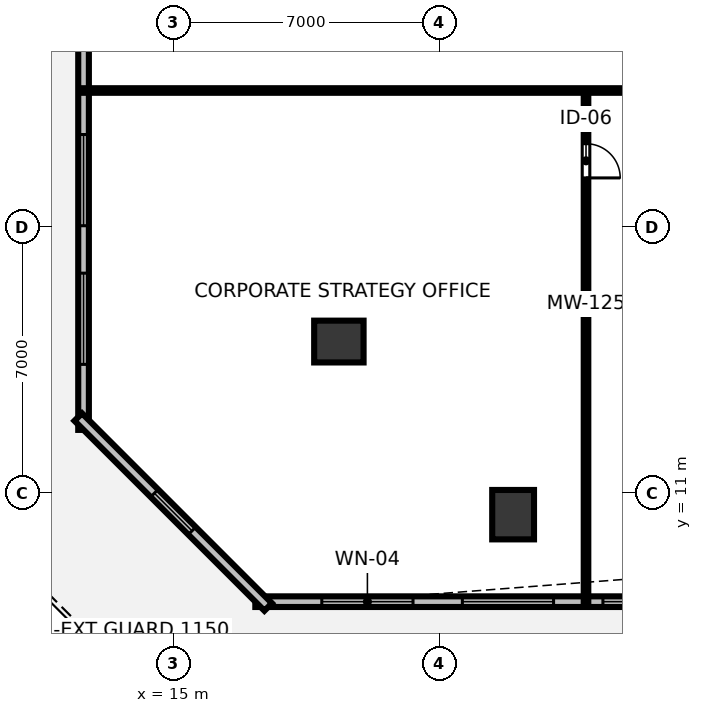
"""IFC4 building model, lengths in metres.
Left out: names, types, materials, properties, quantities, classifications, styles, units other than length and angle.
Written with IfcOpenShell. Run it as: python <this file> out.ifc"""

import sys

from ifc_helpers import new_model, si_unit, direction, frame, frame_2d, origin, origin_2d, place, context, subcontext, project, spatial, rectangle, hollow_rectangle, extrude, element, fill, save


model = new_model("IFC4")
c1 = context("Model", 3, precision=1e-05, world=origin(), true_north=direction((0.0, 1.0)))
c2 = subcontext(c1, "Body", "Model", "MODEL_VIEW")
j1 = project(units=[si_unit("LENGTHUNIT", "METRE"), si_unit("PLANEANGLEUNIT", "RADIAN")], contexts=[c1])
p1 = place(None, origin())
s1 = spatial("IfcSite", under=j1, at=p1, CompositionType="ELEMENT")
p2 = place(p1, origin())
s2 = spatial("IfcBuilding", under=s1, at=p2, CompositionType="ELEMENT")
p3 = place(p2, frame((0.0, 0.0, 14.0)))
s3 = spatial("IfcBuildingStorey", under=s2, at=p3, CompositionType="ELEMENT", Elevation=14.0)
for number, where, z_axis, x_axis in (
    (1, (23.943, 10.429, 0.0), (0.0, 0.0, 1.0), (1.0, 0.0, 0.0)),
    (2, (19.358, 14.984, 0.0), (0.0, 0.0, 1.0), (0.0, 1.0, 0.0)),
):
    element("IfcColumn", number, at=place(p3, frame(where, z_axis=z_axis, x_axis=x_axis)), inside=s3, PredefinedType="COLUMN", context=c2, shape_type="SweptSolid", body=[
        extrude(hollow_rectangle(XDim=1.1, YDim=1.3, WallThickness=0.07, at=origin_2d()), origin(), (0.0, 0.0, 1.0), 4.208),
    ])
p4 = place(p3, frame((17.16, 8.14, 0.0), z_axis=(0.0, 0.0, 1.0), x_axis=(1.0, 0.0, 0.0)))
e3 = element("IfcWall", 3, at=p4, inside=s3, PredefinedType="STANDARD", context=c2, shape_type="SweptSolid", body=[
    extrude(rectangle(XDim=57.68, YDim=0.28, at=frame_2d((28.84, 0.0))), origin(), (0.0, 0.0, 1.0), 4.21),
])
p5 = place(p4, frame((1.749, 0.0, 0.85)))
e4 = element("IfcOpeningElement", 4, at=p5, cuts=e3, PredefinedType="OPENING", context=c2, shape_type="SweptSolid", body=[
    extrude(rectangle(XDim=2.4, YDim=2.4, at=frame_2d((1.2, 1.2))), frame((0.0, 0.15, 0.0), z_axis=(0.0, -1.0, 0.0), x_axis=(1.0, 0.0, 0.0)), (0.0, 0.0, 1.0), 0.3),
])
p6 = place(p4, frame((5.448, 0.0, 0.85)))
e5 = element("IfcOpeningElement", 5, at=p6, cuts=e3, PredefinedType="OPENING", context=c2, shape_type="SweptSolid", body=[
    extrude(rectangle(XDim=2.4, YDim=2.4, at=frame_2d((1.2, 1.2))), frame((0.0, 0.15, 0.0), z_axis=(0.0, -1.0, 0.0), x_axis=(1.0, 0.0, 0.0)), (0.0, 0.0, 1.0), 0.3),
])
p7 = place(p4, frame((9.147, 0.0, 0.85)))
e6 = element("IfcOpeningElement", 6, at=p7, cuts=e3, PredefinedType="OPENING", context=c2, shape_type="SweptSolid", body=[
    extrude(rectangle(XDim=2.4, YDim=2.4, at=frame_2d((1.2, 1.2))), frame((0.0, 0.15, 0.0), z_axis=(0.0, -1.0, 0.0), x_axis=(1.0, 0.0, 0.0)), (0.0, 0.0, 1.0), 0.3),
])
p8 = place(p4, frame((12.845, 0.0, 0.85)))
e7 = element("IfcOpeningElement", 7, at=p8, cuts=e3, PredefinedType="OPENING", context=c2, shape_type="SweptSolid", body=[
    extrude(rectangle(XDim=2.4, YDim=2.4, at=frame_2d((1.2, 1.2))), frame((0.0, 0.15, 0.0), z_axis=(0.0, -1.0, 0.0), x_axis=(1.0, 0.0, 0.0)), (0.0, 0.0, 1.0), 0.3),
])
p9 = place(p4, frame((16.544, 0.0, 0.85)))
e8 = element("IfcOpeningElement", 8, at=p9, cuts=e3, PredefinedType="OPENING", context=c2, shape_type="SweptSolid", body=[
    extrude(rectangle(XDim=2.4, YDim=2.4, at=frame_2d((1.2, 1.2))), frame((0.0, 0.15, 0.0), z_axis=(0.0, -1.0, 0.0), x_axis=(1.0, 0.0, 0.0)), (0.0, 0.0, 1.0), 0.3),
])
p10 = place(p4, frame((23.941, 0.0, 0.85)))
e9 = element("IfcOpeningElement", 9, at=p10, cuts=e3, PredefinedType="OPENING", context=c2, shape_type="SweptSolid", body=[
    extrude(rectangle(XDim=2.4, YDim=2.4, at=frame_2d((1.2, 1.2))), frame((0.0, 0.15, 0.0), z_axis=(0.0, -1.0, 0.0), x_axis=(1.0, 0.0, 0.0)), (0.0, 0.0, 1.0), 0.3),
])
p11 = place(p4, frame((27.64, 0.0, 0.85)))
e10 = element("IfcOpeningElement", 10, at=p11, cuts=e3, PredefinedType="OPENING", context=c2, shape_type="SweptSolid", body=[
    extrude(rectangle(XDim=2.4, YDim=2.4, at=frame_2d((1.2, 1.2))), frame((0.0, 0.15, 0.0), z_axis=(0.0, -1.0, 0.0), x_axis=(1.0, 0.0, 0.0)), (0.0, 0.0, 1.0), 0.3),
])
p12 = place(p4, frame((31.339, 0.0, 0.85)))
e11 = element("IfcOpeningElement", 11, at=p12, cuts=e3, PredefinedType="OPENING", context=c2, shape_type="SweptSolid", body=[
    extrude(rectangle(XDim=2.4, YDim=2.4, at=frame_2d((1.2, 1.2))), frame((0.0, 0.15, 0.0), z_axis=(0.0, -1.0, 0.0), x_axis=(1.0, 0.0, 0.0)), (0.0, 0.0, 1.0), 0.3),
])
p13 = place(p4, frame((35.037, 0.0, 0.85)))
e12 = element("IfcOpeningElement", 12, at=p13, cuts=e3, PredefinedType="OPENING", context=c2, shape_type="SweptSolid", body=[
    extrude(rectangle(XDim=2.4, YDim=2.4, at=frame_2d((1.2, 1.2))), frame((0.0, 0.15, 0.0), z_axis=(0.0, -1.0, 0.0), x_axis=(1.0, 0.0, 0.0)), (0.0, 0.0, 1.0), 0.3),
])
p14 = place(p4, frame((38.736, 0.0, 0.85)))
e13 = element("IfcOpeningElement", 13, at=p14, cuts=e3, PredefinedType="OPENING", context=c2, shape_type="SweptSolid", body=[
    extrude(rectangle(XDim=2.4, YDim=2.4, at=frame_2d((1.2, 1.2))), frame((0.0, 0.15, 0.0), z_axis=(0.0, -1.0, 0.0), x_axis=(1.0, 0.0, 0.0)), (0.0, 0.0, 1.0), 0.3),
])
p15 = place(p4, frame((46.133, 0.0, 0.85)))
e14 = element("IfcOpeningElement", 14, at=p15, cuts=e3, PredefinedType="OPENING", context=c2, shape_type="SweptSolid", body=[
    extrude(rectangle(XDim=2.4, YDim=2.4, at=frame_2d((1.2, 1.2))), frame((0.0, 0.15, 0.0), z_axis=(0.0, -1.0, 0.0), x_axis=(1.0, 0.0, 0.0)), (0.0, 0.0, 1.0), 0.3),
])
p16 = place(p4, frame((49.832, 0.0, 0.85)))
e15 = element("IfcOpeningElement", 15, at=p16, cuts=e3, PredefinedType="OPENING", context=c2, shape_type="SweptSolid", body=[
    extrude(rectangle(XDim=2.4, YDim=2.4, at=frame_2d((1.2, 1.2))), frame((0.0, 0.15, 0.0), z_axis=(0.0, -1.0, 0.0), x_axis=(1.0, 0.0, 0.0)), (0.0, 0.0, 1.0), 0.3),
])
p17 = place(p4, frame((53.531, 0.0, 0.85)))
e16 = element("IfcOpeningElement", 16, at=p17, cuts=e3, PredefinedType="OPENING", context=c2, shape_type="SweptSolid", body=[
    extrude(rectangle(XDim=2.4, YDim=2.4, at=frame_2d((1.2, 1.2))), frame((0.0, 0.15, 0.0), z_axis=(0.0, -1.0, 0.0), x_axis=(1.0, 0.0, 0.0)), (0.0, 0.0, 1.0), 0.3),
])
p18 = place(p3, frame((12.64, 51.34, 0.0), z_axis=(0.0, 0.0, 1.0), x_axis=(0.0, -1.0, 0.0)))
e17 = element("IfcWall", 17, at=p18, inside=s3, PredefinedType="STANDARD", context=c2, shape_type="SweptSolid", body=[
    extrude(rectangle(XDim=38.68, YDim=0.28, at=frame_2d((19.34, 0.0))), origin(), (0.0, 0.0, 1.0), 4.21),
])
p19 = place(p18, frame((23.74, 0.0, 0.0)))
e18 = element("IfcOpeningElement", 18, at=p19, cuts=e17, PredefinedType="OPENING", context=c2, shape_type="SweptSolid", body=[
    extrude(rectangle(XDim=1.6, YDim=2.15, at=frame_2d((0.8, 1.075))), frame((0.0, 0.15, 0.0), z_axis=(0.0, -1.0, 0.0), x_axis=(1.0, 0.0, 0.0)), (0.0, 0.0, 1.0), 0.3),
])
p20 = place(p18, frame((1.724, 0.0, 0.85)))
e19 = element("IfcOpeningElement", 19, at=p20, cuts=e17, PredefinedType="OPENING", context=c2, shape_type="SweptSolid", body=[
    extrude(rectangle(XDim=2.4, YDim=2.4, at=frame_2d((1.2, 1.2))), frame((0.0, 0.15, 0.0), z_axis=(0.0, -1.0, 0.0), x_axis=(1.0, 0.0, 0.0)), (0.0, 0.0, 1.0), 0.3),
])
p21 = place(p18, frame((5.372, 0.0, 0.85)))
e20 = element("IfcOpeningElement", 20, at=p21, cuts=e17, PredefinedType="OPENING", context=c2, shape_type="SweptSolid", body=[
    extrude(rectangle(XDim=2.4, YDim=2.4, at=frame_2d((1.2, 1.2))), frame((0.0, 0.15, 0.0), z_axis=(0.0, -1.0, 0.0), x_axis=(1.0, 0.0, 0.0)), (0.0, 0.0, 1.0), 0.3),
])
p22 = place(p18, frame((12.668, 0.0, 0.85)))
e21 = element("IfcOpeningElement", 21, at=p22, cuts=e17, PredefinedType="OPENING", context=c2, shape_type="SweptSolid", body=[
    extrude(rectangle(XDim=2.4, YDim=2.4, at=frame_2d((1.2, 1.2))), frame((0.0, 0.15, 0.0), z_axis=(0.0, -1.0, 0.0), x_axis=(1.0, 0.0, 0.0)), (0.0, 0.0, 1.0), 0.3),
])
p23 = place(p18, frame((16.316, 0.0, 0.85)))
e22 = element("IfcOpeningElement", 22, at=p23, cuts=e17, PredefinedType="OPENING", context=c2, shape_type="SweptSolid", body=[
    extrude(rectangle(XDim=2.4, YDim=2.4, at=frame_2d((1.2, 1.2))), frame((0.0, 0.15, 0.0), z_axis=(0.0, -1.0, 0.0), x_axis=(1.0, 0.0, 0.0)), (0.0, 0.0, 1.0), 0.3),
])
p24 = place(p18, frame((19.964, 0.0, 0.85)))
e23 = element("IfcOpeningElement", 23, at=p24, cuts=e17, PredefinedType="OPENING", context=c2, shape_type="SweptSolid", body=[
    extrude(rectangle(XDim=2.4, YDim=2.4, at=frame_2d((1.2, 1.2))), frame((0.0, 0.15, 0.0), z_axis=(0.0, -1.0, 0.0), x_axis=(1.0, 0.0, 0.0)), (0.0, 0.0, 1.0), 0.3),
])
p25 = place(p18, frame((30.908, 0.0, 0.85)))
e24 = element("IfcOpeningElement", 24, at=p25, cuts=e17, PredefinedType="OPENING", context=c2, shape_type="SweptSolid", body=[
    extrude(rectangle(XDim=2.4, YDim=2.4, at=frame_2d((1.2, 1.2))), frame((0.0, 0.15, 0.0), z_axis=(0.0, -1.0, 0.0), x_axis=(1.0, 0.0, 0.0)), (0.0, 0.0, 1.0), 0.3),
])
p26 = place(p18, frame((34.556, 0.0, 0.85)))
e25 = element("IfcOpeningElement", 25, at=p26, cuts=e17, PredefinedType="OPENING", context=c2, shape_type="SweptSolid", body=[
    extrude(rectangle(XDim=2.4, YDim=2.4, at=frame_2d((1.2, 1.2))), frame((0.0, 0.15, 0.0), z_axis=(0.0, -1.0, 0.0), x_axis=(1.0, 0.0, 0.0)), (0.0, 0.0, 1.0), 0.3),
])
p27 = place(p3, frame((12.5, 12.998, 0.0), z_axis=(0.0, 0.0, 1.0), x_axis=(0.707106781187, -0.707106781187, 0.0)))
e26 = element("IfcWall", 26, at=p27, inside=s3, PredefinedType="STANDARD", context=c2, shape_type="SweptSolid", body=[
    extrude(rectangle(XDim=7.068, YDim=0.28, at=frame_2d((3.534, 0.0))), origin(), (0.0, 0.0, 1.0), 4.21),
])
p28 = place(p27, frame((2.834, 0.0, 1.5)))
e27 = element("IfcOpeningElement", 27, at=p28, cuts=e26, PredefinedType="OPENING", context=c2, shape_type="SweptSolid", body=[
    extrude(rectangle(XDim=1.4, YDim=1.2, at=frame_2d((0.7, 0.6))), frame((0.0, 0.15, 0.0), z_axis=(0.0, -1.0, 0.0), x_axis=(1.0, 0.0, 0.0)), (0.0, 0.0, 1.0), 0.3),
])
p29 = place(p3, frame((25.862, 21.59, 0.0), z_axis=(0.0, 0.0, 1.0), x_axis=(0.0, -1.0, 0.0)))
e28 = element("IfcWall", 28, at=p29, inside=s3, PredefinedType="MOVABLE", context=c2, shape_type="SweptSolid", body=[
    extrude(rectangle(XDim=13.45, YDim=0.12, at=frame_2d((6.725, 0.0))), origin(), (0.0, 0.0, 1.0), 3.31),
])
p30 = place(p29, frame((1.4, 0.0, 0.0)))
e29 = element("IfcOpeningElement", 29, at=p30, cuts=e28, PredefinedType="OPENING", context=c2, shape_type="SweptSolid", body=[
    extrude(rectangle(XDim=0.9, YDim=2.15, at=frame_2d((0.45, 1.075))), frame((0.0, 0.07, 0.0), z_axis=(0.0, -1.0, 0.0), x_axis=(1.0, 0.0, 0.0)), (0.0, 0.0, 1.0), 0.14),
])
p31 = place(p3, frame((34.65, 21.59, 0.0), z_axis=(0.0, 0.0, 1.0), x_axis=(-1.0, 0.0, 0.0)))
e30 = element("IfcWall", 30, at=p31, inside=s3, PredefinedType="PARTITIONING", context=c2, shape_type="SweptSolid", body=[
    extrude(rectangle(XDim=22.01, YDim=0.12, at=frame_2d((11.005, 0.0))), origin(), (0.0, 0.0, 1.0), 3.31),
])
p32 = place(p5, origin())
e31 = element("IfcWindow", 31, at=p32, inside=s3, PartitioningType="SINGLE_PANEL", PredefinedType="WINDOW", context=c2, shape_type="SweptSolid", body=[
    extrude(rectangle(XDim=2.4, YDim=2.4, at=frame_2d((1.2, 1.2))), frame((0.0, 0.03, 0.0), z_axis=(0.0, -1.0, 0.0), x_axis=(1.0, 0.0, 0.0)), (0.0, 0.0, 1.0), 0.06),
])
fill(e4, e31)
p33 = place(p6, origin())
e32 = element("IfcWindow", 32, at=p33, inside=s3, PartitioningType="SINGLE_PANEL", PredefinedType="WINDOW", context=c2, shape_type="SweptSolid", body=[
    extrude(rectangle(XDim=2.4, YDim=2.4, at=frame_2d((1.2, 1.2))), frame((0.0, 0.03, 0.0), z_axis=(0.0, -1.0, 0.0), x_axis=(1.0, 0.0, 0.0)), (0.0, 0.0, 1.0), 0.06),
])
fill(e5, e32)
p34 = place(p7, origin())
e33 = element("IfcWindow", 33, at=p34, inside=s3, PartitioningType="SINGLE_PANEL", PredefinedType="WINDOW", context=c2, shape_type="SweptSolid", body=[
    extrude(rectangle(XDim=2.4, YDim=2.4, at=frame_2d((1.2, 1.2))), frame((0.0, 0.03, 0.0), z_axis=(0.0, -1.0, 0.0), x_axis=(1.0, 0.0, 0.0)), (0.0, 0.0, 1.0), 0.06),
])
fill(e6, e33)
p35 = place(p25, origin())
e34 = element("IfcWindow", 34, at=p35, inside=s3, PartitioningType="SINGLE_PANEL", PredefinedType="WINDOW", context=c2, shape_type="SweptSolid", body=[
    extrude(rectangle(XDim=2.4, YDim=2.4, at=frame_2d((1.2, 1.2))), frame((0.0, 0.03, 0.0), z_axis=(0.0, -1.0, 0.0), x_axis=(1.0, 0.0, 0.0)), (0.0, 0.0, 1.0), 0.06),
])
fill(e24, e34)
p36 = place(p26, origin())
e35 = element("IfcWindow", 35, at=p36, inside=s3, PartitioningType="SINGLE_PANEL", PredefinedType="WINDOW", context=c2, shape_type="SweptSolid", body=[
    extrude(rectangle(XDim=2.4, YDim=2.4, at=frame_2d((1.2, 1.2))), frame((0.0, 0.03, 0.0), z_axis=(0.0, -1.0, 0.0), x_axis=(1.0, 0.0, 0.0)), (0.0, 0.0, 1.0), 0.06),
])
fill(e25, e35)
p37 = place(p28, origin())
e36 = element("IfcWindow", 36, at=p37, inside=s3, PartitioningType="SINGLE_PANEL", PredefinedType="WINDOW", context=c2, shape_type="SweptSolid", body=[
    extrude(rectangle(XDim=1.4, YDim=1.2, at=frame_2d((0.7, 0.6))), frame((0.0, 0.03, 0.0), z_axis=(0.0, -1.0, 0.0), x_axis=(1.0, 0.0, 0.0)), (0.0, 0.0, 1.0), 0.06),
])
fill(e27, e36)
p38 = place(p30, origin())
e37 = element("IfcDoor", 37, at=p38, inside=s3, OperationType="SINGLE_SWING_RIGHT", PredefinedType="DOOR", context=c2, shape_type="SweptSolid", body=[
    extrude(rectangle(XDim=0.9, YDim=2.15, at=frame_2d((0.45, 1.075))), frame((0.0, 0.025, 0.0), z_axis=(0.0, -1.0, 0.0), x_axis=(1.0, 0.0, 0.0)), (0.0, 0.0, 1.0), 0.05),
])
fill(e29, e37)
save(model, sys.argv[1])
